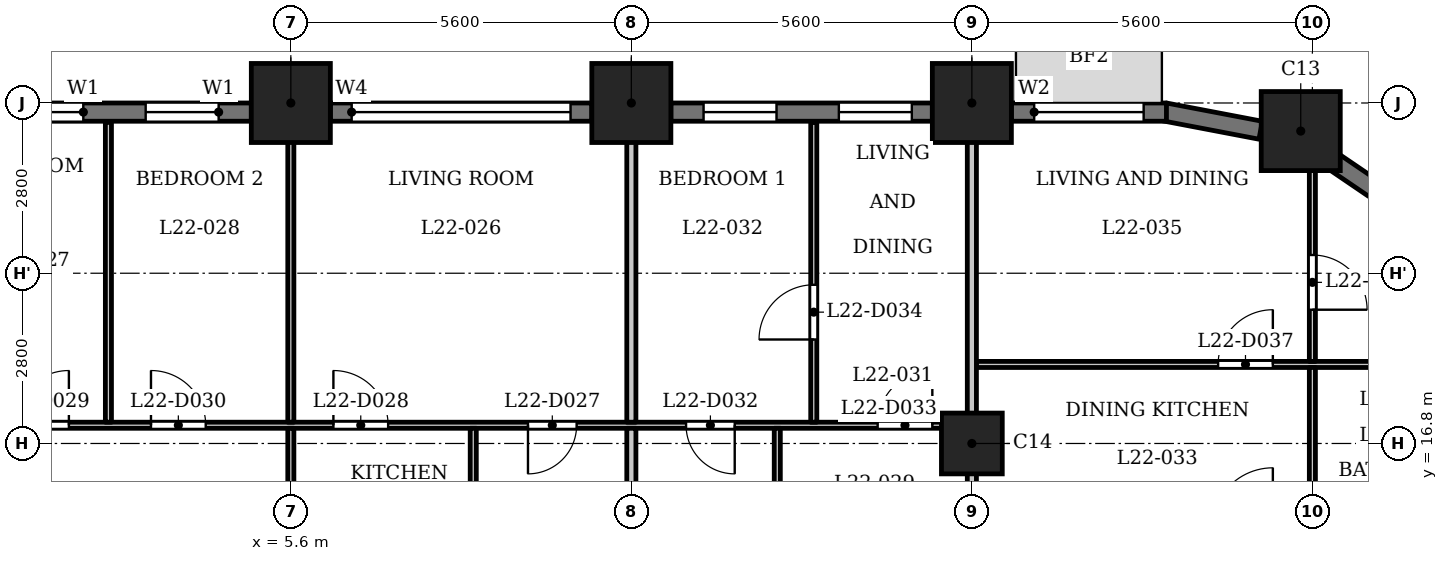
"""IFC4 building model, lengths in metres.
Left out: names, types, materials, properties, quantities, classifications, styles, units other than length and angle.
Written with IfcOpenShell. Run it as: python <this file> out.ifc"""

import sys

from ifc_helpers import new_model, si_unit, direction, frame, frame_2d, origin, origin_2d, place, context, subcontext, project, spatial, rectangle, extrude, element, fill, save


model = new_model("IFC4")
c1 = context("Model", 3, precision=1e-05, world=origin(), true_north=direction((0.0, 1.0)))
c2 = subcontext(c1, "Body", "Model", "MODEL_VIEW")
j1 = project(units=[si_unit("LENGTHUNIT", "METRE"), si_unit("PLANEANGLEUNIT", "RADIAN")], contexts=[c1])
p1 = place(None, origin())
s1 = spatial("IfcSite", under=j1, at=p1, CompositionType="ELEMENT")
p2 = place(p1, origin())
s2 = spatial("IfcBuilding", under=s1, at=p2, CompositionType="ELEMENT")
p3 = place(p2, frame((0.0, 0.0, 90.3)))
s3 = spatial("IfcBuildingStorey", under=s2, at=p3, CompositionType="ELEMENT", Elevation=90.3)
for number, where, z_axis, x_axis in (
    (1, (22.209, 21.938, 0.0), (0.0, 0.0, 1.0), (1.0, 0.0, 0.0)),
    (2, (16.8, 22.4, 0.0), (0.0, 0.0, 1.0), (1.0, 0.0, 0.0)),
    (3, (11.2, 22.4, 0.0), (0.0, 0.0, 1.0), (1.0, 0.0, 0.0)),
    (4, (5.6, 22.4, 0.0), (0.0, 0.0, 1.0), (1.0, 0.0, 0.0)),
):
    element("IfcColumn", number, at=place(p3, frame(where, z_axis=z_axis, x_axis=x_axis)), inside=s3, PredefinedType="COLUMN", context=c2, shape_type="SweptSolid", body=[
        extrude(rectangle(XDim=1.3, YDim=1.3, at=origin_2d()), origin(), (0.0, 0.0, 1.0), 3.5),
    ])
p4 = place(p3, frame((16.8, 16.8, 0.0), z_axis=(0.0, 0.0, 1.0), x_axis=(1.0, 0.0, 0.0)))
e5 = element("IfcColumn", 5, at=p4, inside=s3, PredefinedType="COLUMN", context=c2, shape_type="SweptSolid", body=[
    extrude(rectangle(XDim=1.0, YDim=1.0, at=origin_2d()), origin(), (0.0, 0.0, 1.0), 3.5),
])
p5 = place(p3, frame((23.41, 20.989, 0.0), z_axis=(0.0, 0.0, 1.0), x_axis=(-0.827050703543, 0.562127328787, 0.0)))
e6 = element("IfcWall", 6, at=p5, inside=s3, PredefinedType="SOLIDWALL", context=c2, shape_type="SweptSolid", body=[
    extrude(rectangle(XDim=0.877, YDim=0.3, at=frame_2d((0.438, 0.0))), origin(), (0.0, 0.0, 1.0), 3.2),
])
p6 = place(p3, frame((21.55, 21.952, 0.0), z_axis=(0.0, 0.0, 1.0), x_axis=(-0.982278644094, 0.187426426519, 0.0)))
e7 = element("IfcWall", 7, at=p6, inside=s3, PredefinedType="SOLIDWALL", context=c2, shape_type="SweptSolid", body=[
    extrude(rectangle(XDim=1.606, YDim=0.3, at=frame_2d((0.803, 0.0))), origin(), (0.0, 0.0, 1.0), 2.4),
])
p7 = place(p3, frame((20.0, 22.25, 0.0), z_axis=(0.0, 0.0, 1.0), x_axis=(-1.0, 0.0, 0.0)))
e8 = element("IfcWall", 8, at=p7, inside=s3, PredefinedType="SOLIDWALL", context=c2, shape_type="SweptSolid", body=[
    extrude(rectangle(XDim=2.55, YDim=0.3, at=frame_2d((1.275, 0.0))), origin(), (0.0, 0.0, 1.0), 2.4),
])
p8 = place(p7, frame((0.375, 0.0, 0.9)))
e9 = element("IfcOpeningElement", 9, at=p8, cuts=e8, PredefinedType="OPENING", context=c2, shape_type="SweptSolid", body=[
    extrude(rectangle(XDim=1.8, YDim=1.25, at=frame_2d((0.9, 0.625))), frame((0.0, 0.16, 0.0), z_axis=(0.0, -1.0, 0.0), x_axis=(1.0, 0.0, 0.0)), (0.0, 0.0, 1.0), 0.32),
])
p9 = place(p3, frame((16.15, 22.25, 0.0), z_axis=(0.0, 0.0, 1.0), x_axis=(-1.0, 0.0, 0.0)))
e10 = element("IfcWall", 10, at=p9, inside=s3, PredefinedType="SOLIDWALL", context=c2, shape_type="SweptSolid", body=[
    extrude(rectangle(XDim=4.3, YDim=0.3, at=frame_2d((2.15, 0.0))), origin(), (0.0, 0.0, 1.0), 2.4),
])
p10 = place(p9, frame((0.337, 0.0, 0.6)))
e11 = element("IfcOpeningElement", 11, at=p10, cuts=e10, PredefinedType="OPENING", context=c2, shape_type="SweptSolid", body=[
    extrude(rectangle(XDim=1.2, YDim=1.55, at=frame_2d((0.6, 0.775))), frame((0.0, 0.16, 0.0), z_axis=(0.0, -1.0, 0.0), x_axis=(1.0, 0.0, 0.0)), (0.0, 0.0, 1.0), 0.32),
])
p11 = place(p9, frame((2.562, 0.0, 0.6)))
e12 = element("IfcOpeningElement", 12, at=p11, cuts=e10, PredefinedType="OPENING", context=c2, shape_type="SweptSolid", body=[
    extrude(rectangle(XDim=1.2, YDim=1.55, at=frame_2d((0.6, 0.775))), frame((0.0, 0.16, 0.0), z_axis=(0.0, -1.0, 0.0), x_axis=(1.0, 0.0, 0.0)), (0.0, 0.0, 1.0), 0.32),
])
p12 = place(p3, frame((10.55, 22.25, 0.0), z_axis=(0.0, 0.0, 1.0), x_axis=(-1.0, 0.0, 0.0)))
e13 = element("IfcWall", 13, at=p12, inside=s3, PredefinedType="SOLIDWALL", context=c2, shape_type="SweptSolid", body=[
    extrude(rectangle(XDim=4.3, YDim=0.3, at=frame_2d((2.15, 0.0))), origin(), (0.0, 0.0, 1.0), 2.4),
])
p13 = place(p12, frame((0.35, 0.0, 1.2)))
e14 = element("IfcOpeningElement", 14, at=p13, cuts=e13, PredefinedType="OPENING", context=c2, shape_type="SweptSolid", body=[
    extrude(rectangle(XDim=3.6, YDim=0.95, at=frame_2d((1.8, 0.475))), frame((0.0, 0.16, 0.0), z_axis=(0.0, -1.0, 0.0), x_axis=(1.0, 0.0, 0.0)), (0.0, 0.0, 1.0), 0.32),
])
p14 = place(p3, frame((4.95, 22.25, 0.0), z_axis=(0.0, 0.0, 1.0), x_axis=(-1.0, 0.0, 0.0)))
e15 = element("IfcWall", 15, at=p14, inside=s3, PredefinedType="SOLIDWALL", context=c2, shape_type="SweptSolid", body=[
    extrude(rectangle(XDim=4.3, YDim=0.3, at=frame_2d((2.15, 0.0))), origin(), (0.0, 0.0, 1.0), 2.4),
])
p15 = place(p14, frame((0.538, 0.0, 0.6)))
e16 = element("IfcOpeningElement", 16, at=p15, cuts=e15, PredefinedType="OPENING", context=c2, shape_type="SweptSolid", body=[
    extrude(rectangle(XDim=1.2, YDim=1.55, at=frame_2d((0.6, 0.775))), frame((0.0, 0.16, 0.0), z_axis=(0.0, -1.0, 0.0), x_axis=(1.0, 0.0, 0.0)), (0.0, 0.0, 1.0), 0.32),
])
p16 = place(p14, frame((2.762, 0.0, 0.6)))
e17 = element("IfcOpeningElement", 17, at=p16, cuts=e15, PredefinedType="OPENING", context=c2, shape_type="SweptSolid", body=[
    extrude(rectangle(XDim=1.2, YDim=1.55, at=frame_2d((0.6, 0.775))), frame((0.0, 0.16, 0.0), z_axis=(0.0, -1.0, 0.0), x_axis=(1.0, 0.0, 0.0)), (0.0, 0.0, 1.0), 0.32),
])
p17 = place(p3, frame((-16.725, 17.1, 0.0), z_axis=(0.0, 0.0, 1.0), x_axis=(1.0, 0.0, 0.0)))
e18 = element("IfcWall", 18, at=p17, inside=s3, PredefinedType="PARTITIONING", context=c2, shape_type="SweptSolid", body=[
    extrude(rectangle(XDim=33.45, YDim=0.1, at=frame_2d((16.725, 0.0))), origin(), (0.0, 0.0, 1.0), 3.2),
])
p18 = place(p17, frame((3.925, 0.0, 0.0)))
e19 = element("IfcOpeningElement", 19, at=p18, cuts=e18, PredefinedType="OPENING", context=c2, shape_type="SweptSolid", body=[
    extrude(rectangle(XDim=0.8, YDim=2.1, at=frame_2d((0.4, 1.05))), frame((0.0, 0.06, 0.0), z_axis=(0.0, -1.0, 0.0), x_axis=(1.0, 0.0, 0.0)), (0.0, 0.0, 1.0), 0.12),
])
p19 = place(p17, frame((0.975, 0.0, 0.0)))
e20 = element("IfcOpeningElement", 20, at=p19, cuts=e18, PredefinedType="OPENING", context=c2, shape_type="SweptSolid", body=[
    extrude(rectangle(XDim=0.9, YDim=2.1, at=frame_2d((0.45, 1.05))), frame((0.0, 0.06, 0.0), z_axis=(0.0, -1.0, 0.0), x_axis=(1.0, 0.0, 0.0)), (0.0, 0.0, 1.0), 0.12),
])
p20 = place(p17, frame((6.425, 0.0, 0.0)))
e21 = element("IfcOpeningElement", 21, at=p20, cuts=e18, PredefinedType="OPENING", context=c2, shape_type="SweptSolid", body=[
    extrude(rectangle(XDim=0.8, YDim=2.1, at=frame_2d((0.4, 1.05))), frame((0.0, 0.06, 0.0), z_axis=(0.0, -1.0, 0.0), x_axis=(1.0, 0.0, 0.0)), (0.0, 0.0, 1.0), 0.12),
])
p21 = place(p17, frame((8.825, 0.0, 0.0)))
e22 = element("IfcOpeningElement", 22, at=p21, cuts=e18, PredefinedType="OPENING", context=c2, shape_type="SweptSolid", body=[
    extrude(rectangle(XDim=0.9, YDim=2.1, at=frame_2d((0.45, 1.05))), frame((0.0, 0.06, 0.0), z_axis=(0.0, -1.0, 0.0), x_axis=(1.0, 0.0, 0.0)), (0.0, 0.0, 1.0), 0.12),
])
p22 = place(p17, frame((12.375, 0.0, 0.0)))
e23 = element("IfcOpeningElement", 23, at=p22, cuts=e18, PredefinedType="OPENING", context=c2, shape_type="SweptSolid", body=[
    extrude(rectangle(XDim=0.9, YDim=2.1, at=frame_2d((0.45, 1.05))), frame((0.0, 0.06, 0.0), z_axis=(0.0, -1.0, 0.0), x_axis=(1.0, 0.0, 0.0)), (0.0, 0.0, 1.0), 0.12),
])
p23 = place(p17, frame((14.425, 0.0, 0.0)))
e24 = element("IfcOpeningElement", 24, at=p23, cuts=e18, PredefinedType="OPENING", context=c2, shape_type="SweptSolid", body=[
    extrude(rectangle(XDim=0.9, YDim=2.1, at=frame_2d((0.45, 1.05))), frame((0.0, 0.06, 0.0), z_axis=(0.0, -1.0, 0.0), x_axis=(1.0, 0.0, 0.0)), (0.0, 0.0, 1.0), 0.12),
])
p24 = place(p17, frame((26.225, 0.0, 0.0)))
e25 = element("IfcOpeningElement", 25, at=p24, cuts=e18, PredefinedType="OPENING", context=c2, shape_type="SweptSolid", body=[
    extrude(rectangle(XDim=0.8, YDim=2.1, at=frame_2d((0.4, 1.05))), frame((0.0, 0.06, 0.0), z_axis=(0.0, -1.0, 0.0), x_axis=(1.0, 0.0, 0.0)), (0.0, 0.0, 1.0), 0.12),
])
p25 = place(p17, frame((23.025, 0.0, 0.0)))
e26 = element("IfcOpeningElement", 26, at=p25, cuts=e18, PredefinedType="OPENING", context=c2, shape_type="SweptSolid", body=[
    extrude(rectangle(XDim=0.9, YDim=2.1, at=frame_2d((0.45, 1.05))), frame((0.0, 0.06, 0.0), z_axis=(0.0, -1.0, 0.0), x_axis=(1.0, 0.0, 0.0)), (0.0, 0.0, 1.0), 0.12),
])
p26 = place(p17, frame((17.775, 0.0, 0.0)))
e27 = element("IfcOpeningElement", 27, at=p26, cuts=e18, PredefinedType="OPENING", context=c2, shape_type="SweptSolid", body=[
    extrude(rectangle(XDim=0.9, YDim=2.1, at=frame_2d((0.45, 1.05))), frame((0.0, 0.06, 0.0), z_axis=(0.0, -1.0, 0.0), x_axis=(1.0, 0.0, 0.0)), (0.0, 0.0, 1.0), 0.12),
])
p27 = place(p17, frame((20.025, 0.0, 0.0)))
e28 = element("IfcOpeningElement", 28, at=p27, cuts=e18, PredefinedType="OPENING", context=c2, shape_type="SweptSolid", body=[
    extrude(rectangle(XDim=0.9, YDim=2.1, at=frame_2d((0.45, 1.05))), frame((0.0, 0.06, 0.0), z_axis=(0.0, -1.0, 0.0), x_axis=(1.0, 0.0, 0.0)), (0.0, 0.0, 1.0), 0.12),
])
p28 = place(p17, frame((28.825, 0.0, 0.0)))
e29 = element("IfcOpeningElement", 29, at=p28, cuts=e18, PredefinedType="OPENING", context=c2, shape_type="SweptSolid", body=[
    extrude(rectangle(XDim=0.8, YDim=2.1, at=frame_2d((0.4, 1.05))), frame((0.0, 0.06, 0.0), z_axis=(0.0, -1.0, 0.0), x_axis=(1.0, 0.0, 0.0)), (0.0, 0.0, 1.0), 0.12),
])
p29 = place(p17, frame((31.975, 0.0, 0.0)))
e30 = element("IfcOpeningElement", 30, at=p29, cuts=e18, PredefinedType="OPENING", context=c2, shape_type="SweptSolid", body=[
    extrude(rectangle(XDim=0.9, YDim=2.1, at=frame_2d((0.45, 1.05))), frame((0.0, 0.06, 0.0), z_axis=(0.0, -1.0, 0.0), x_axis=(1.0, 0.0, 0.0)), (0.0, 0.0, 1.0), 0.12),
])
p30 = place(p3, frame((16.875, 18.1, 0.0), z_axis=(0.0, 0.0, 1.0), x_axis=(1.0, 0.0, 0.0)))
e31 = element("IfcWall", 31, at=p30, inside=s3, PredefinedType="PARTITIONING", context=c2, shape_type="SweptSolid", body=[
    extrude(rectangle(XDim=9.315, YDim=0.1, at=frame_2d((4.658, 0.0))), origin(), (0.0, 0.0, 1.0), 3.2),
])
p31 = place(p30, frame((7.425, 0.0, 0.0)))
e32 = element("IfcOpeningElement", 32, at=p31, cuts=e31, PredefinedType="OPENING", context=c2, shape_type="SweptSolid", body=[
    extrude(rectangle(XDim=0.8, YDim=2.1, at=frame_2d((0.4, 1.05))), frame((0.0, 0.06, 0.0), z_axis=(0.0, -1.0, 0.0), x_axis=(1.0, 0.0, 0.0)), (0.0, 0.0, 1.0), 0.12),
])
p32 = place(p30, frame((3.975, 0.0, 0.0)))
e33 = element("IfcOpeningElement", 33, at=p32, cuts=e31, PredefinedType="OPENING", context=c2, shape_type="SweptSolid", body=[
    extrude(rectangle(XDim=0.9, YDim=2.1, at=frame_2d((0.45, 1.05))), frame((0.0, 0.06, 0.0), z_axis=(0.0, -1.0, 0.0), x_axis=(1.0, 0.0, 0.0)), (0.0, 0.0, 1.0), 0.12),
])
p33 = place(p3, frame((2.6, 17.15, 0.0), z_axis=(0.0, 0.0, 1.0), x_axis=(0.0, 1.0, 0.0)))
e34 = element("IfcWall", 34, at=p33, inside=s3, PredefinedType="PARTITIONING", context=c2, shape_type="SweptSolid", body=[
    extrude(rectangle(XDim=4.93, YDim=0.1, at=frame_2d((2.465, 0.0))), origin(), (0.0, 0.0, 1.0), 3.2),
])
p34 = place(p3, frame((5.6, 13.275, 0.0), z_axis=(0.0, 0.0, 1.0), x_axis=(0.0, 1.0, 0.0)))
e35 = element("IfcWall", 35, at=p34, inside=s3, PredefinedType="PARTITIONING", context=c2, shape_type="SweptSolid", body=[
    extrude(rectangle(XDim=3.775, YDim=0.1, at=frame_2d((1.888, 0.0))), origin(), (0.0, 0.0, 1.0), 3.2),
])
p35 = place(p34, frame((0.576, 0.0, 0.0)))
e36 = element("IfcOpeningElement", 36, at=p35, cuts=e35, PredefinedType="OPENING", context=c2, shape_type="SweptSolid", body=[
    extrude(rectangle(XDim=0.9, YDim=2.1, at=frame_2d((0.45, 1.05))), frame((0.0, 0.06, 0.0), z_axis=(0.0, -1.0, 0.0), x_axis=(1.0, 0.0, 0.0)), (0.0, 0.0, 1.0), 0.12),
])
p36 = place(p3, frame((5.6, 17.15, 0.0), z_axis=(0.0, 0.0, 1.0), x_axis=(0.0, 1.0, 0.0)))
e37 = element("IfcWall", 37, at=p36, inside=s3, PredefinedType="PARTITIONING", context=c2, shape_type="SweptSolid", body=[
    extrude(rectangle(XDim=5.88, YDim=0.1, at=frame_2d((2.94, 0.0))), origin(), (0.0, 0.0, 1.0), 3.2),
])
p37 = place(p3, frame((8.6, 13.275, 0.0), z_axis=(0.0, 0.0, 1.0), x_axis=(0.0, 1.0, 0.0)))
e38 = element("IfcWall", 38, at=p37, inside=s3, PredefinedType="PARTITIONING", context=c2, shape_type="SweptSolid", body=[
    extrude(rectangle(XDim=3.775, YDim=0.1, at=frame_2d((1.888, 0.0))), origin(), (0.0, 0.0, 1.0), 3.2),
])
p38 = place(p3, frame((11.2, 13.275, 0.0), z_axis=(0.0, 0.0, 1.0), x_axis=(0.0, 1.0, 0.0)))
e39 = element("IfcWall", 39, at=p38, inside=s3, PredefinedType="PARTITIONING", context=c2, shape_type="SweptSolid", body=[
    extrude(rectangle(XDim=3.775, YDim=0.15, at=frame_2d((1.888, 0.0))), origin(), (0.0, 0.0, 1.0), 3.2),
])
p39 = place(p3, frame((11.2, 17.15, 0.0), z_axis=(0.0, 0.0, 1.0), x_axis=(0.0, 1.0, 0.0)))
e40 = element("IfcWall", 40, at=p39, inside=s3, PredefinedType="PARTITIONING", context=c2, shape_type="SweptSolid", body=[
    extrude(rectangle(XDim=5.88, YDim=0.15, at=frame_2d((2.94, 0.0))), origin(), (0.0, 0.0, 1.0), 3.2),
])
p40 = place(p3, frame((13.6, 13.275, 0.0), z_axis=(0.0, 0.0, 1.0), x_axis=(0.0, 1.0, 0.0)))
e41 = element("IfcWall", 41, at=p40, inside=s3, PredefinedType="PARTITIONING", context=c2, shape_type="SweptSolid", body=[
    extrude(rectangle(XDim=3.775, YDim=0.1, at=frame_2d((1.888, 0.0))), origin(), (0.0, 0.0, 1.0), 3.2),
])
p41 = place(p3, frame((14.2, 17.15, 0.0), z_axis=(0.0, 0.0, 1.0), x_axis=(0.0, 1.0, 0.0)))
e42 = element("IfcWall", 42, at=p41, inside=s3, PredefinedType="PARTITIONING", context=c2, shape_type="SweptSolid", body=[
    extrude(rectangle(XDim=4.93, YDim=0.1, at=frame_2d((2.465, 0.0))), origin(), (0.0, 0.0, 1.0), 3.2),
])
p42 = place(p41, frame((1.36, 0.0, 0.0)))
e43 = element("IfcOpeningElement", 43, at=p42, cuts=e42, PredefinedType="OPENING", context=c2, shape_type="SweptSolid", body=[
    extrude(rectangle(XDim=0.9, YDim=2.1, at=frame_2d((0.45, 1.05))), frame((0.0, 0.06, 0.0), z_axis=(0.0, -1.0, 0.0), x_axis=(1.0, 0.0, 0.0)), (0.0, 0.0, 1.0), 0.12),
])
p43 = place(p3, frame((16.8, 15.475, 0.0), z_axis=(0.0, 0.0, 1.0), x_axis=(0.0, 1.0, 0.0)))
e44 = element("IfcWall", 44, at=p43, inside=s3, PredefinedType="PARTITIONING", context=c2, shape_type="SweptSolid", body=[
    extrude(rectangle(XDim=7.555, YDim=0.15, at=frame_2d((3.777, 0.0))), origin(), (0.0, 0.0, 1.0), 3.2),
])
p44 = place(p3, frame((22.4, 15.475, 0.0), z_axis=(0.0, 0.0, 1.0), x_axis=(0.0, 1.0, 0.0)))
e45 = element("IfcWall", 45, at=p44, inside=s3, PredefinedType="PARTITIONING", context=c2, shape_type="SweptSolid", body=[
    extrude(rectangle(XDim=2.575, YDim=0.1, at=frame_2d((1.288, 0.0))), origin(), (0.0, 0.0, 1.0), 3.2),
])
p45 = place(p3, frame((22.4, 18.15, 0.0), z_axis=(0.0, 0.0, 1.0), x_axis=(0.0, 1.0, 0.0)))
e46 = element("IfcWall", 46, at=p45, inside=s3, PredefinedType="PARTITIONING", context=c2, shape_type="SweptSolid", body=[
    extrude(rectangle(XDim=3.57, YDim=0.1, at=frame_2d((1.785, 0.0))), origin(), (0.0, 0.0, 1.0), 3.2),
])
p46 = place(p45, frame((0.85, 0.0, 0.0)))
e47 = element("IfcOpeningElement", 47, at=p46, cuts=e46, PredefinedType="OPENING", context=c2, shape_type="SweptSolid", body=[
    extrude(rectangle(XDim=0.9, YDim=2.1, at=frame_2d((0.45, 1.05))), frame((0.0, 0.06, 0.0), z_axis=(0.0, -1.0, 0.0), x_axis=(1.0, 0.0, 0.0)), (0.0, 0.0, 1.0), 0.12),
])
p47 = place(p24, origin())
e48 = element("IfcDoor", 48, at=p47, inside=s3, OperationType="SINGLE_SWING_LEFT", PredefinedType="DOOR", context=c2, shape_type="SweptSolid", body=[
    extrude(rectangle(XDim=0.8, YDim=2.1, at=frame_2d((0.4, 1.05))), frame((0.0, 0.025, 0.0), z_axis=(0.0, -1.0, 0.0), x_axis=(1.0, 0.0, 0.0)), (0.0, 0.0, 1.0), 0.05),
])
fill(e25, e48)
p48 = place(p25, origin())
e49 = element("IfcDoor", 49, at=p48, inside=s3, OperationType="SINGLE_SWING_RIGHT", PredefinedType="DOOR", context=c2, shape_type="SweptSolid", body=[
    extrude(rectangle(XDim=0.9, YDim=2.1, at=frame_2d((0.45, 1.05))), frame((0.0, 0.025, 0.0), z_axis=(0.0, -1.0, 0.0), x_axis=(1.0, 0.0, 0.0)), (0.0, 0.0, 1.0), 0.05),
])
fill(e26, e49)
p49 = place(p26, origin())
e50 = element("IfcDoor", 50, at=p49, inside=s3, OperationType="SINGLE_SWING_LEFT", PredefinedType="DOOR", context=c2, shape_type="SweptSolid", body=[
    extrude(rectangle(XDim=0.9, YDim=2.1, at=frame_2d((0.45, 1.05))), frame((0.0, 0.025, 0.0), z_axis=(0.0, -1.0, 0.0), x_axis=(1.0, 0.0, 0.0)), (0.0, 0.0, 1.0), 0.05),
])
fill(e27, e50)
p50 = place(p27, origin())
e51 = element("IfcDoor", 51, at=p50, inside=s3, OperationType="SINGLE_SWING_RIGHT", PredefinedType="DOOR", context=c2, shape_type="SweptSolid", body=[
    extrude(rectangle(XDim=0.9, YDim=2.1, at=frame_2d((0.45, 1.05))), frame((0.0, 0.025, 0.0), z_axis=(0.0, -1.0, 0.0), x_axis=(1.0, 0.0, 0.0)), (0.0, 0.0, 1.0), 0.05),
])
fill(e28, e51)
p51 = place(p28, origin())
e52 = element("IfcDoor", 52, at=p51, inside=s3, OperationType="SINGLE_SWING_RIGHT", PredefinedType="DOOR", context=c2, shape_type="SweptSolid", body=[
    extrude(rectangle(XDim=0.8, YDim=2.1, at=frame_2d((0.4, 1.05))), frame((0.0, 0.025, 0.0), z_axis=(0.0, -1.0, 0.0), x_axis=(1.0, 0.0, 0.0)), (0.0, 0.0, 1.0), 0.05),
])
fill(e29, e52)
p52 = place(p29, origin())
e53 = element("IfcDoor", 53, at=p52, inside=s3, OperationType="SINGLE_SWING_LEFT", PredefinedType="DOOR", context=c2, shape_type="SweptSolid", body=[
    extrude(rectangle(XDim=0.9, YDim=2.1, at=frame_2d((0.45, 1.05))), frame((0.0, 0.025, 0.0), z_axis=(0.0, -1.0, 0.0), x_axis=(1.0, 0.0, 0.0)), (0.0, 0.0, 1.0), 0.05),
])
fill(e30, e53)
p53 = place(p42, origin())
e54 = element("IfcDoor", 54, at=p53, inside=s3, OperationType="SINGLE_SWING_RIGHT", PredefinedType="DOOR", context=c2, shape_type="SweptSolid", body=[
    extrude(rectangle(XDim=0.9, YDim=2.1, at=frame_2d((0.45, 1.05))), frame((0.0, 0.025, 0.0), z_axis=(0.0, -1.0, 0.0), x_axis=(1.0, 0.0, 0.0)), (0.0, 0.0, 1.0), 0.05),
])
fill(e43, e54)
p54 = place(p32, origin())
e55 = element("IfcDoor", 55, at=p54, inside=s3, OperationType="SINGLE_SWING_LEFT", PredefinedType="DOOR", context=c2, shape_type="SweptSolid", body=[
    extrude(rectangle(XDim=0.9, YDim=2.1, at=frame_2d((0.45, 1.05))), frame((0.0, 0.025, 0.0), z_axis=(0.0, -1.0, 0.0), x_axis=(1.0, 0.0, 0.0)), (0.0, 0.0, 1.0), 0.05),
])
fill(e33, e55)
p55 = place(p46, origin())
e56 = element("IfcDoor", 56, at=p55, inside=s3, OperationType="SINGLE_SWING_LEFT", PredefinedType="DOOR", context=c2, shape_type="SweptSolid", body=[
    extrude(rectangle(XDim=0.9, YDim=2.1, at=frame_2d((0.45, 1.05))), frame((0.0, 0.025, 0.0), z_axis=(0.0, -1.0, 0.0), x_axis=(1.0, 0.0, 0.0)), (0.0, 0.0, 1.0), 0.05),
])
fill(e47, e56)
p56 = place(p8, origin())
e57 = element("IfcWindow", 57, at=p56, inside=s3, PartitioningType="SINGLE_PANEL", PredefinedType="WINDOW", context=c2, shape_type="SweptSolid", body=[
    extrude(rectangle(XDim=1.8, YDim=1.25, at=frame_2d((0.9, 0.625))), frame((0.0, 0.03, 0.0), z_axis=(0.0, -1.0, 0.0), x_axis=(1.0, 0.0, 0.0)), (0.0, 0.0, 1.0), 0.06),
])
fill(e9, e57)
p57 = place(p10, origin())
e58 = element("IfcWindow", 58, at=p57, inside=s3, PartitioningType="SINGLE_PANEL", PredefinedType="WINDOW", context=c2, shape_type="SweptSolid", body=[
    extrude(rectangle(XDim=1.2, YDim=1.55, at=frame_2d((0.6, 0.775))), frame((0.0, 0.03, 0.0), z_axis=(0.0, -1.0, 0.0), x_axis=(1.0, 0.0, 0.0)), (0.0, 0.0, 1.0), 0.06),
])
fill(e11, e58)
p58 = place(p11, origin())
e59 = element("IfcWindow", 59, at=p58, inside=s3, PartitioningType="SINGLE_PANEL", PredefinedType="WINDOW", context=c2, shape_type="SweptSolid", body=[
    extrude(rectangle(XDim=1.2, YDim=1.55, at=frame_2d((0.6, 0.775))), frame((0.0, 0.03, 0.0), z_axis=(0.0, -1.0, 0.0), x_axis=(1.0, 0.0, 0.0)), (0.0, 0.0, 1.0), 0.06),
])
fill(e12, e59)
p59 = place(p13, origin())
e60 = element("IfcWindow", 60, at=p59, inside=s3, PartitioningType="SINGLE_PANEL", PredefinedType="WINDOW", context=c2, shape_type="SweptSolid", body=[
    extrude(rectangle(XDim=3.6, YDim=0.95, at=frame_2d((1.8, 0.475))), frame((0.0, 0.03, 0.0), z_axis=(0.0, -1.0, 0.0), x_axis=(1.0, 0.0, 0.0)), (0.0, 0.0, 1.0), 0.06),
])
fill(e14, e60)
p60 = place(p15, origin())
e61 = element("IfcWindow", 61, at=p60, inside=s3, PartitioningType="SINGLE_PANEL", PredefinedType="WINDOW", context=c2, shape_type="SweptSolid", body=[
    extrude(rectangle(XDim=1.2, YDim=1.55, at=frame_2d((0.6, 0.775))), frame((0.0, 0.03, 0.0), z_axis=(0.0, -1.0, 0.0), x_axis=(1.0, 0.0, 0.0)), (0.0, 0.0, 1.0), 0.06),
])
fill(e16, e61)
p61 = place(p16, origin())
e62 = element("IfcWindow", 62, at=p61, inside=s3, PartitioningType="SINGLE_PANEL", PredefinedType="WINDOW", context=c2, shape_type="SweptSolid", body=[
    extrude(rectangle(XDim=1.2, YDim=1.55, at=frame_2d((0.6, 0.775))), frame((0.0, 0.03, 0.0), z_axis=(0.0, -1.0, 0.0), x_axis=(1.0, 0.0, 0.0)), (0.0, 0.0, 1.0), 0.06),
])
fill(e17, e62)
save(model, sys.argv[1])
